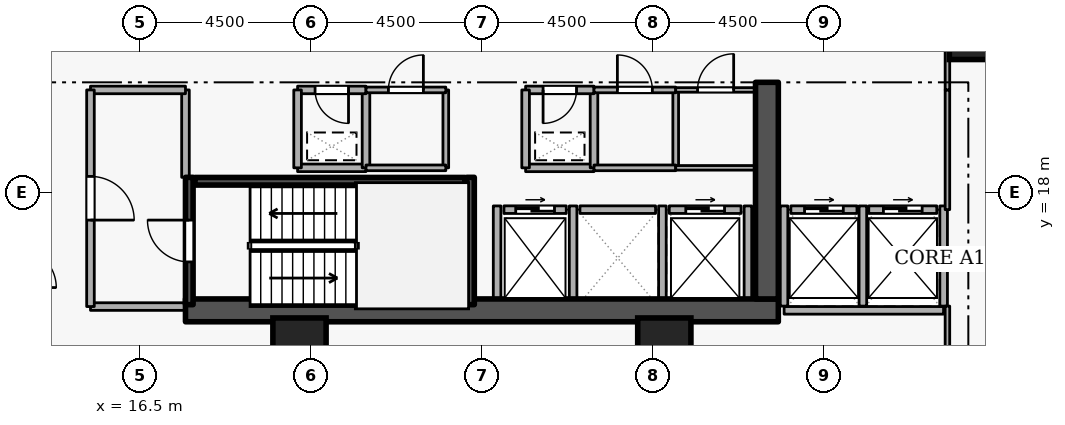
"""IFC4 building model, lengths in metres.
Left out: names, types, materials, properties, quantities, classifications, styles, units other than length and angle.
Written with IfcOpenShell. Run it as: python <this file> out.ifc"""

import sys

from ifc_helpers import new_model, si_unit, direction, frame, frame_2d, origin, origin_2d, place, context, subcontext, project, spatial, rectangle, extrude, element, fill, save


model = new_model("IFC4")
c1 = context("Model", 3, precision=1e-05, world=origin(), true_north=direction((0.0, 1.0)))
c2 = subcontext(c1, "Body", "Model", "MODEL_VIEW")
j1 = project(units=[si_unit("LENGTHUNIT", "METRE"), si_unit("PLANEANGLEUNIT", "RADIAN")], contexts=[c1])
p1 = place(None, origin())
s1 = spatial("IfcSite", under=j1, at=p1, CompositionType="ELEMENT")
p2 = place(p1, origin())
s2 = spatial("IfcBuilding", under=s1, at=p2, CompositionType="ELEMENT")
p3 = place(p2, frame((0.0, 0.0, 68.1)))
s3 = spatial("IfcBuildingStorey", under=s2, at=p3, CompositionType="ELEMENT", Elevation=68.1)
p4 = place(p3, frame((17.7, 14.9, 0.0), z_axis=(0.0, 0.0, 1.0), x_axis=(1.0, 0.0, 0.0)))
e1 = element("IfcWall", 1, at=p4, inside=s3, PredefinedType="SHEAR", context=c2, shape_type="SweptSolid", body=[
    extrude(rectangle(XDim=15.6, YDim=0.6, at=frame_2d((7.8, 0.0))), origin(), (0.0, 0.0, 1.0), 3.6),
])
p5 = place(p3, frame((33.0, 15.2, 0.0), z_axis=(0.0, 0.0, 1.0), x_axis=(0.0, 1.0, 0.0)))
e2 = element("IfcWall", 2, at=p5, inside=s3, PredefinedType="SHEAR", context=c2, shape_type="SweptSolid", body=[
    extrude(rectangle(XDim=5.7, YDim=0.6, at=frame_2d((2.85, 0.0))), origin(), (0.0, 0.0, 1.0), 3.6),
])
for number, where, z_axis, x_axis in (
    (3, (38.5, 22.2, 0.0), (0.0, 0.0, 1.0), (1.0, 0.0, 0.0)),
    (4, (20.7, 14.0, 0.0), (0.0, 0.0, 1.0), (1.0, 0.0, 0.0)),
    (5, (30.3, 14.0, 0.0), (0.0, 0.0, 1.0), (1.0, 0.0, 0.0)),
):
    element("IfcColumn", number, at=place(p3, frame(where, z_axis=z_axis, x_axis=x_axis)), inside=s3, PredefinedType="COLUMN", context=c2, shape_type="SweptSolid", body=[
        extrude(rectangle(XDim=1.4, YDim=1.4, at=origin_2d()), origin(), (0.0, 0.0, 1.0), 3.6),
    ])
p6 = place(p3, frame((26.08, 17.55, 0.0), z_axis=(0.0, 0.0, 1.0), x_axis=(1.0, 0.0, 0.0)))
e6 = element("IfcWall", 6, at=p6, inside=s3, PredefinedType="STANDARD", context=c2, shape_type="SweptSolid", body=[
    extrude(rectangle(XDim=1.64, YDim=0.2, at=frame_2d((0.82, 0.0))), origin(), (0.0, 0.0, 1.0), 3.26),
])
p7 = place(p6, frame((0.31, 0.0, 0.0)))
e7 = element("IfcOpeningElement", 7, at=p7, cuts=e6, PredefinedType="OPENING", context=c2, shape_type="SweptSolid", body=[
    extrude(rectangle(XDim=1.02, YDim=2.06, at=frame_2d((0.51, 1.03))), frame((0.0, 0.11, 0.0), z_axis=(0.0, -1.0, 0.0), x_axis=(1.0, 0.0, 0.0)), (0.0, 0.0, 1.0), 0.22),
])
p8 = place(p3, frame((28.08, 17.55, 0.0), z_axis=(0.0, 0.0, 1.0), x_axis=(1.0, 0.0, 0.0)))
e8 = element("IfcWall", 8, at=p8, inside=s3, PredefinedType="STANDARD", context=c2, shape_type="SweptSolid", body=[
    extrude(rectangle(XDim=1.99, YDim=0.2, at=frame_2d((0.995, 0.0))), origin(), (0.0, 0.0, 1.0), 3.26),
])
p9 = place(p3, frame((30.43, 17.55, 0.0), z_axis=(0.0, 0.0, 1.0), x_axis=(1.0, 0.0, 0.0)))
e9 = element("IfcWall", 9, at=p9, inside=s3, PredefinedType="STANDARD", context=c2, shape_type="SweptSolid", body=[
    extrude(rectangle(XDim=1.89, YDim=0.2, at=frame_2d((0.945, 0.0))), origin(), (0.0, 0.0, 1.0), 3.26),
])
p10 = place(p9, frame((0.435, 0.0, 0.0)))
e10 = element("IfcOpeningElement", 10, at=p10, cuts=e9, PredefinedType="OPENING", context=c2, shape_type="SweptSolid", body=[
    extrude(rectangle(XDim=1.02, YDim=2.06, at=frame_2d((0.51, 1.03))), frame((0.0, 0.11, 0.0), z_axis=(0.0, -1.0, 0.0), x_axis=(1.0, 0.0, 0.0)), (0.0, 0.0, 1.0), 0.22),
])
p11 = place(p3, frame((33.63, 17.55, 0.0), z_axis=(0.0, 0.0, 1.0), x_axis=(1.0, 0.0, 0.0)))
e11 = element("IfcWall", 11, at=p11, inside=s3, PredefinedType="STANDARD", context=c2, shape_type="SweptSolid", body=[
    extrude(rectangle(XDim=1.74, YDim=0.2, at=frame_2d((0.87, 0.0))), origin(), (0.0, 0.0, 1.0), 3.26),
])
p12 = place(p11, frame((0.36, 0.0, 0.0)))
e12 = element("IfcOpeningElement", 12, at=p12, cuts=e11, PredefinedType="OPENING", context=c2, shape_type="SweptSolid", body=[
    extrude(rectangle(XDim=1.02, YDim=2.06, at=frame_2d((0.51, 1.03))), frame((0.0, 0.11, 0.0), z_axis=(0.0, -1.0, 0.0), x_axis=(1.0, 0.0, 0.0)), (0.0, 0.0, 1.0), 0.22),
])
p13 = place(p3, frame((35.68, 17.55, 0.0), z_axis=(0.0, 0.0, 1.0), x_axis=(1.0, 0.0, 0.0)))
e13 = element("IfcWall", 13, at=p13, inside=s3, PredefinedType="STANDARD", context=c2, shape_type="SweptSolid", body=[
    extrude(rectangle(XDim=1.79, YDim=0.2, at=frame_2d((0.895, 0.0))), origin(), (0.0, 0.0, 1.0), 3.26),
])
p14 = place(p13, frame((0.385, 0.0, 0.0)))
e14 = element("IfcOpeningElement", 14, at=p14, cuts=e13, PredefinedType="OPENING", context=c2, shape_type="SweptSolid", body=[
    extrude(rectangle(XDim=1.02, YDim=2.06, at=frame_2d((0.51, 1.03))), frame((0.0, 0.11, 0.0), z_axis=(0.0, -1.0, 0.0), x_axis=(1.0, 0.0, 0.0)), (0.0, 0.0, 1.0), 0.22),
])
for number, where, z_axis, x_axis in (
    (15, (27.9, 15.212, 0.0), (0.0, 0.0, 1.0), (0.0, 1.0, 0.0)),
    (16, (25.9, 15.212, 0.0), (0.0, 0.0, 1.0), (0.0, 1.0, 0.0)),
    (17, (30.25, 15.212, 0.0), (0.0, 0.0, 1.0), (0.0, 1.0, 0.0)),
    (18, (32.5, 15.212, 0.0), (0.0, 0.0, 1.0), (0.0, 1.0, 0.0)),
):
    element("IfcWall", number, at=place(p3, frame(where, z_axis=z_axis, x_axis=x_axis)), inside=s3, PredefinedType="STANDARD", context=c2, shape_type="SweptSolid", body=[
        extrude(rectangle(XDim=2.436, YDim=0.2, at=frame_2d((1.218, 0.0))), origin(), (0.0, 0.0, 1.0), 3.26),
    ])
p15 = place(p3, frame((33.452, 14.9, 0.0), z_axis=(0.0, 0.0, 1.0), x_axis=(1.0, 0.0, 0.0)))
e19 = element("IfcWall", 19, at=p15, inside=s3, PredefinedType="STANDARD", context=c2, shape_type="SweptSolid", body=[
    extrude(rectangle(XDim=4.196, YDim=0.2, at=frame_2d((2.098, 0.0))), origin(), (0.0, 0.0, 1.0), 3.26),
])
for number, where, z_axis, x_axis in (
    (20, (35.525, 15.012, 0.0), (0.0, 0.0, 1.0), (0.0, 1.0, 0.0)),
    (21, (33.45, 15.012, 0.0), (0.0, 0.0, 1.0), (0.0, 1.0, 0.0)),
    (22, (37.65, 15.012, 0.0), (0.0, 0.0, 1.0), (0.0, 1.0, 0.0)),
):
    element("IfcWall", number, at=place(p3, frame(where, z_axis=z_axis, x_axis=x_axis)), inside=s3, PredefinedType="STANDARD", context=c2, shape_type="SweptSolid", body=[
        extrude(rectangle(XDim=2.636, YDim=0.2, at=frame_2d((1.318, 0.0))), origin(), (0.0, 0.0, 1.0), 3.26),
    ])
p16 = place(p3, frame((17.8, 15.05, 0.0), z_axis=(0.0, 0.0, 1.0), x_axis=(0.0, 1.0, 0.0)))
e23 = element("IfcWall", 23, at=p16, inside=s3, PredefinedType="SHEAR", context=c2, shape_type="SweptSolid", body=[
    extrude(rectangle(XDim=3.35, YDim=0.2, at=frame_2d((1.675, 0.0))), origin(), (0.0, 0.0, 1.0), 3.6),
])
p17 = place(p16, frame((1.125, 0.0, 0.0)))
e24 = element("IfcOpeningElement", 24, at=p17, cuts=e23, PredefinedType="OPENING", context=c2, shape_type="SweptSolid", body=[
    extrude(rectangle(XDim=1.1, YDim=2.1, at=frame_2d((0.55, 1.05))), frame((0.0, 0.11, 0.0), z_axis=(0.0, -1.0, 0.0), x_axis=(1.0, 0.0, 0.0)), (0.0, 0.0, 1.0), 0.22),
])
p18 = place(p3, frame((25.2, 18.4, 0.0), z_axis=(0.0, 0.0, 1.0), x_axis=(0.0, -1.0, 0.0)))
e25 = element("IfcWall", 25, at=p18, inside=s3, PredefinedType="SHEAR", context=c2, shape_type="SweptSolid", body=[
    extrude(rectangle(XDim=3.35, YDim=0.2, at=frame_2d((1.675, 0.0))), origin(), (0.0, 0.0, 1.0), 3.6),
])
p19 = place(p3, frame((25.05, 18.297, 0.0), z_axis=(0.0, 0.0, 1.0), x_axis=(-1.0, 0.0, 0.0)))
e26 = element("IfcWall", 26, at=p19, inside=s3, PredefinedType="SHEAR", context=c2, shape_type="SweptSolid", body=[
    extrude(rectangle(XDim=7.1, YDim=0.2, at=frame_2d((3.55, 0.0))), origin(), (0.0, 0.0, 1.0), 3.6),
])
p20 = place(p3, frame((15.2, 15.0, 0.0), z_axis=(0.0, 0.0, 1.0), x_axis=(1.0, 0.0, 0.0)))
e27 = element("IfcWall", 27, at=p20, inside=s3, PredefinedType="STANDARD", context=c2, shape_type="SweptSolid", body=[
    extrude(rectangle(XDim=2.5, YDim=0.2, at=frame_2d((1.25, 0.0))), origin(), (0.0, 0.0, 1.0), 3.26),
])
p21 = place(p3, frame((17.7, 18.4, 0.0), z_axis=(0.0, 0.0, 1.0), x_axis=(0.0, 1.0, 0.0)))
e28 = element("IfcWall", 28, at=p21, inside=s3, PredefinedType="STANDARD", context=c2, shape_type="SweptSolid", body=[
    extrude(rectangle(XDim=2.3, YDim=0.2, at=frame_2d((1.15, 0.0))), origin(), (0.0, 0.0, 1.0), 2.465),
])
p22 = place(p3, frame((17.7, 20.7, 0.0), z_axis=(0.0, 0.0, 1.0), x_axis=(-1.0, 0.0, 0.0)))
e29 = element("IfcWall", 29, at=p22, inside=s3, PredefinedType="STANDARD", context=c2, shape_type="SweptSolid", body=[
    extrude(rectangle(XDim=2.5, YDim=0.2, at=frame_2d((1.25, 0.0))), origin(), (0.0, 0.0, 1.0), 3.26),
])
p23 = place(p3, frame((15.2, 20.7, 0.0), z_axis=(0.0, 0.0, 1.0), x_axis=(0.0, -1.0, 0.0)))
e30 = element("IfcWall", 30, at=p23, inside=s3, PredefinedType="STANDARD", context=c2, shape_type="SweptSolid", body=[
    extrude(rectangle(XDim=5.7, YDim=0.2, at=frame_2d((2.85, 0.0))), origin(), (0.0, 0.0, 1.0), 3.26),
])
p24 = place(p23, frame((2.275, 0.0, 0.0)))
e31 = element("IfcOpeningElement", 31, at=p24, cuts=e30, PredefinedType="OPENING", context=c2, shape_type="SweptSolid", body=[
    extrude(rectangle(XDim=1.15, YDim=2.1, at=frame_2d((0.575, 1.05))), frame((0.0, 0.11, 0.0), z_axis=(0.0, -1.0, 0.0), x_axis=(1.0, 0.0, 0.0)), (0.0, 0.0, 1.0), 0.22),
])
p25 = place(p3, frame((26.65, 18.65, 0.0), z_axis=(0.0, 0.0, 1.0), x_axis=(1.0, 0.0, 0.0)))
e32 = element("IfcWall", 32, at=p25, inside=s3, PredefinedType="STANDARD", context=c2, shape_type="SweptSolid", body=[
    extrude(rectangle(XDim=1.8, YDim=0.2, at=frame_2d((0.9, 0.0))), origin(), (0.0, 0.0, 1.0), 3.26),
])
p26 = place(p3, frame((28.45, 18.65, 0.0), z_axis=(0.0, 0.0, 1.0), x_axis=(0.0, 1.0, 0.0)))
e33 = element("IfcWall", 33, at=p26, inside=s3, PredefinedType="STANDARD", context=c2, shape_type="SweptSolid", body=[
    extrude(rectangle(XDim=2.05, YDim=0.2, at=frame_2d((1.025, 0.0))), origin(), (0.0, 0.0, 1.0), 3.26),
])
p27 = place(p3, frame((28.45, 20.7, 0.0), z_axis=(0.0, 0.0, 1.0), x_axis=(-1.0, 0.0, 0.0)))
e34 = element("IfcWall", 34, at=p27, inside=s3, PredefinedType="STANDARD", context=c2, shape_type="SweptSolid", body=[
    extrude(rectangle(XDim=1.8, YDim=0.2, at=frame_2d((0.9, 0.0))), origin(), (0.0, 0.0, 1.0), 3.26),
])
p28 = place(p27, frame((0.46, 0.0, 0.0)))
e35 = element("IfcOpeningElement", 35, at=p28, cuts=e34, PredefinedType="OPENING", context=c2, shape_type="SweptSolid", body=[
    extrude(rectangle(XDim=0.88, YDim=2.04, at=frame_2d((0.44, 1.02))), frame((0.0, 0.11, 0.0), z_axis=(0.0, -1.0, 0.0), x_axis=(1.0, 0.0, 0.0)), (0.0, 0.0, 1.0), 0.22),
])
p29 = place(p3, frame((26.65, 20.7, 0.0), z_axis=(0.0, 0.0, 1.0), x_axis=(0.0, -1.0, 0.0)))
e36 = element("IfcWall", 36, at=p29, inside=s3, PredefinedType="STANDARD", context=c2, shape_type="SweptSolid", body=[
    extrude(rectangle(XDim=2.05, YDim=0.2, at=frame_2d((1.025, 0.0))), origin(), (0.0, 0.0, 1.0), 3.26),
])
p30 = place(p3, frame((20.65, 18.65, 0.0), z_axis=(0.0, 0.0, 1.0), x_axis=(1.0, 0.0, 0.0)))
e37 = element("IfcWall", 37, at=p30, inside=s3, PredefinedType="STANDARD", context=c2, shape_type="SweptSolid", body=[
    extrude(rectangle(XDim=1.8, YDim=0.2, at=frame_2d((0.9, 0.0))), origin(), (0.0, 0.0, 1.0), 3.26),
])
p31 = place(p3, frame((22.45, 18.65, 0.0), z_axis=(0.0, 0.0, 1.0), x_axis=(0.0, 1.0, 0.0)))
e38 = element("IfcWall", 38, at=p31, inside=s3, PredefinedType="STANDARD", context=c2, shape_type="SweptSolid", body=[
    extrude(rectangle(XDim=2.05, YDim=0.2, at=frame_2d((1.025, 0.0))), origin(), (0.0, 0.0, 1.0), 3.26),
])
p32 = place(p3, frame((22.45, 20.7, 0.0), z_axis=(0.0, 0.0, 1.0), x_axis=(-1.0, 0.0, 0.0)))
e39 = element("IfcWall", 39, at=p32, inside=s3, PredefinedType="STANDARD", context=c2, shape_type="SweptSolid", body=[
    extrude(rectangle(XDim=1.8, YDim=0.2, at=frame_2d((0.9, 0.0))), origin(), (0.0, 0.0, 1.0), 3.26),
])
p33 = place(p32, frame((0.46, 0.0, 0.0)))
e40 = element("IfcOpeningElement", 40, at=p33, cuts=e39, PredefinedType="OPENING", context=c2, shape_type="SweptSolid", body=[
    extrude(rectangle(XDim=0.88, YDim=2.04, at=frame_2d((0.44, 1.02))), frame((0.0, 0.11, 0.0), z_axis=(0.0, -1.0, 0.0), x_axis=(1.0, 0.0, 0.0)), (0.0, 0.0, 1.0), 0.22),
])
p34 = place(p3, frame((20.65, 20.7, 0.0), z_axis=(0.0, 0.0, 1.0), x_axis=(0.0, -1.0, 0.0)))
e41 = element("IfcWall", 41, at=p34, inside=s3, PredefinedType="STANDARD", context=c2, shape_type="SweptSolid", body=[
    extrude(rectangle(XDim=2.05, YDim=0.2, at=frame_2d((1.025, 0.0))), origin(), (0.0, 0.0, 1.0), 3.26),
])
p35 = place(p3, frame((24.55, 20.7, 0.0), z_axis=(0.0, 0.0, 1.0), x_axis=(0.0, -1.0, 0.0)))
e42 = element("IfcWall", 42, at=p35, inside=s3, PredefinedType="PARTITIONING", context=c2, shape_type="SweptSolid", body=[
    extrude(rectangle(XDim=2.05, YDim=0.15, at=frame_2d((1.025, 0.0))), origin(), (0.0, 0.0, 1.0), 3.26),
])
p36 = place(p3, frame((24.55, 18.65, 0.0), z_axis=(0.0, 0.0, 1.0), x_axis=(-1.0, 0.0, 0.0)))
e43 = element("IfcWall", 43, at=p36, inside=s3, PredefinedType="PARTITIONING", context=c2, shape_type="SweptSolid", body=[
    extrude(rectangle(XDim=2.1, YDim=0.15, at=frame_2d((1.05, 0.0))), origin(), (0.0, 0.0, 1.0), 3.26),
])
p37 = place(p3, frame((22.45, 20.7, 0.0), z_axis=(0.0, 0.0, 1.0), x_axis=(1.0, 0.0, 0.0)))
e44 = element("IfcWall", 44, at=p37, inside=s3, PredefinedType="PARTITIONING", context=c2, shape_type="SweptSolid", body=[
    extrude(rectangle(XDim=2.1, YDim=0.15, at=frame_2d((1.05, 0.0))), origin(), (0.0, 0.0, 1.0), 3.26),
])
p38 = place(p37, frame((0.59, 0.0, 0.0)))
e45 = element("IfcOpeningElement", 45, at=p38, cuts=e44, PredefinedType="OPENING", context=c2, shape_type="SweptSolid", body=[
    extrude(rectangle(XDim=0.92, YDim=2.08, at=frame_2d((0.46, 1.04))), frame((0.0, 0.085, 0.0), z_axis=(0.0, -1.0, 0.0), x_axis=(1.0, 0.0, 0.0)), (0.0, 0.0, 1.0), 0.17),
])
p39 = place(p3, frame((30.6, 20.7, 0.0), z_axis=(0.0, 0.0, 1.0), x_axis=(0.0, -1.0, 0.0)))
e46 = element("IfcWall", 46, at=p39, inside=s3, PredefinedType="PARTITIONING", context=c2, shape_type="SweptSolid", body=[
    extrude(rectangle(XDim=2.05, YDim=0.15, at=frame_2d((1.025, 0.0))), origin(), (0.0, 0.0, 1.0), 3.26),
])
p40 = place(p3, frame((30.6, 18.65, 0.0), z_axis=(0.0, 0.0, 1.0), x_axis=(-1.0, 0.0, 0.0)))
e47 = element("IfcWall", 47, at=p40, inside=s3, PredefinedType="PARTITIONING", context=c2, shape_type="SweptSolid", body=[
    extrude(rectangle(XDim=2.15, YDim=0.15, at=frame_2d((1.075, 0.0))), origin(), (0.0, 0.0, 1.0), 3.26),
])
p41 = place(p3, frame((28.45, 20.7, 0.0), z_axis=(0.0, 0.0, 1.0), x_axis=(1.0, 0.0, 0.0)))
e48 = element("IfcWall", 48, at=p41, inside=s3, PredefinedType="PARTITIONING", context=c2, shape_type="SweptSolid", body=[
    extrude(rectangle(XDim=2.15, YDim=0.15, at=frame_2d((1.075, 0.0))), origin(), (0.0, 0.0, 1.0), 3.26),
])
p42 = place(p41, frame((0.615, 0.0, 0.0)))
e49 = element("IfcOpeningElement", 49, at=p42, cuts=e48, PredefinedType="OPENING", context=c2, shape_type="SweptSolid", body=[
    extrude(rectangle(XDim=0.92, YDim=2.08, at=frame_2d((0.46, 1.04))), frame((0.0, 0.085, 0.0), z_axis=(0.0, -1.0, 0.0), x_axis=(1.0, 0.0, 0.0)), (0.0, 0.0, 1.0), 0.17),
])
p43 = place(p3, frame((32.7, 18.65, 0.0), z_axis=(0.0, 0.0, 1.0), x_axis=(-1.0, 0.0, 0.0)))
e50 = element("IfcWall", 50, at=p43, inside=s3, PredefinedType="PARTITIONING", context=c2, shape_type="SweptSolid", body=[
    extrude(rectangle(XDim=2.1, YDim=0.12, at=frame_2d((1.05, 0.0))), origin(), (0.0, 0.0, 1.0), 3.26),
])
p44 = place(p3, frame((30.6, 20.7, 0.0), z_axis=(0.0, 0.0, 1.0), x_axis=(1.0, 0.0, 0.0)))
e51 = element("IfcWall", 51, at=p44, inside=s3, PredefinedType="PARTITIONING", context=c2, shape_type="SweptSolid", body=[
    extrude(rectangle(XDim=2.1, YDim=0.12, at=frame_2d((1.05, 0.0))), origin(), (0.0, 0.0, 1.0), 3.26),
])
p45 = place(p44, frame((0.575, 0.0, 0.0)))
e52 = element("IfcOpeningElement", 52, at=p45, cuts=e51, PredefinedType="OPENING", context=c2, shape_type="SweptSolid", body=[
    extrude(rectangle(XDim=0.95, YDim=2.1, at=frame_2d((0.475, 1.05))), frame((0.0, 0.07, 0.0), z_axis=(0.0, -1.0, 0.0), x_axis=(1.0, 0.0, 0.0)), (0.0, 0.0, 1.0), 0.14),
])
p46 = place(p3, frame((37.75, 17.55, 0.0), z_axis=(0.0, 0.0, 1.0), x_axis=(0.0, 1.0, 0.0)))
e53 = element("IfcWall", 53, at=p46, inside=s3, PredefinedType="PARTITIONING", context=c2, shape_type="SweptSolid", body=[
    extrude(rectangle(XDim=3.15, YDim=0.12, at=frame_2d((1.575, 0.0))), origin(), (0.0, 0.0, 1.0), 3.26),
])
p47 = place(p3, frame((37.75, 20.7, 0.0), z_axis=(0.0, 0.0, 1.0), x_axis=(0.0, 1.0, 0.0)))
e54 = element("IfcWall", 54, at=p47, inside=s3, PredefinedType="PARTITIONING", context=c2, shape_type="SweptSolid", body=[
    extrude(rectangle(XDim=1.85, YDim=0.12, at=frame_2d((0.925, 0.0))), origin(), (0.0, 0.0, 1.0), 3.26),
])
p48 = place(p3, frame((37.75, 13.15, 0.0), z_axis=(0.0, 0.0, 1.0), x_axis=(0.0, 1.0, 0.0)))
e55 = element("IfcWall", 55, at=p48, inside=s3, PredefinedType="PARTITIONING", context=c2, shape_type="SweptSolid", body=[
    extrude(rectangle(XDim=1.862, YDim=0.12, at=frame_2d((0.931, 0.0))), origin(), (0.0, 0.0, 1.0), 3.26),
])
p49 = place(p7, origin())
e56 = element("IfcDoor", 56, at=p49, inside=s3, OperationType="SLIDING_TO_LEFT", PredefinedType="DOOR", context=c2, shape_type="SweptSolid", body=[
    extrude(rectangle(XDim=1.02, YDim=2.06, at=frame_2d((0.51, 1.03))), frame((0.0, 0.025, 0.0), z_axis=(0.0, -1.0, 0.0), x_axis=(1.0, 0.0, 0.0)), (0.0, 0.0, 1.0), 0.05),
])
fill(e7, e56)
p50 = place(p10, origin())
e57 = element("IfcDoor", 57, at=p50, inside=s3, OperationType="SLIDING_TO_LEFT", PredefinedType="DOOR", context=c2, shape_type="SweptSolid", body=[
    extrude(rectangle(XDim=1.02, YDim=2.06, at=frame_2d((0.51, 1.03))), frame((0.0, 0.025, 0.0), z_axis=(0.0, -1.0, 0.0), x_axis=(1.0, 0.0, 0.0)), (0.0, 0.0, 1.0), 0.05),
])
fill(e10, e57)
p51 = place(p12, origin())
e58 = element("IfcDoor", 58, at=p51, inside=s3, OperationType="SLIDING_TO_LEFT", PredefinedType="DOOR", context=c2, shape_type="SweptSolid", body=[
    extrude(rectangle(XDim=1.02, YDim=2.06, at=frame_2d((0.51, 1.03))), frame((0.0, 0.025, 0.0), z_axis=(0.0, -1.0, 0.0), x_axis=(1.0, 0.0, 0.0)), (0.0, 0.0, 1.0), 0.05),
])
fill(e12, e58)
p52 = place(p14, origin())
e59 = element("IfcDoor", 59, at=p52, inside=s3, OperationType="SLIDING_TO_LEFT", PredefinedType="DOOR", context=c2, shape_type="SweptSolid", body=[
    extrude(rectangle(XDim=1.02, YDim=2.06, at=frame_2d((0.51, 1.03))), frame((0.0, 0.025, 0.0), z_axis=(0.0, -1.0, 0.0), x_axis=(1.0, 0.0, 0.0)), (0.0, 0.0, 1.0), 0.05),
])
fill(e14, e59)
p53 = place(p17, origin())
e60 = element("IfcDoor", 60, at=p53, inside=s3, OperationType="SINGLE_SWING_RIGHT", PredefinedType="DOOR", context=c2, shape_type="SweptSolid", body=[
    extrude(rectangle(XDim=1.1, YDim=2.1, at=frame_2d((0.55, 1.05))), frame((0.0, 0.025, 0.0), z_axis=(0.0, -1.0, 0.0), x_axis=(1.0, 0.0, 0.0)), (0.0, 0.0, 1.0), 0.05),
])
fill(e24, e60)
p54 = place(p24, origin())
e61 = element("IfcDoor", 61, at=p54, inside=s3, OperationType="SINGLE_SWING_RIGHT", PredefinedType="DOOR", context=c2, shape_type="SweptSolid", body=[
    extrude(rectangle(XDim=1.15, YDim=2.1, at=frame_2d((0.575, 1.05))), frame((0.0, 0.025, 0.0), z_axis=(0.0, -1.0, 0.0), x_axis=(1.0, 0.0, 0.0)), (0.0, 0.0, 1.0), 0.05),
])
fill(e31, e61)
p55 = place(p28, origin())
e62 = element("IfcDoor", 62, at=p55, inside=s3, OperationType="SINGLE_SWING_RIGHT", PredefinedType="DOOR", context=c2, shape_type="SweptSolid", body=[
    extrude(rectangle(XDim=0.88, YDim=2.04, at=frame_2d((0.44, 1.02))), frame((0.0, 0.025, 0.0), z_axis=(0.0, -1.0, 0.0), x_axis=(1.0, 0.0, 0.0)), (0.0, 0.0, 1.0), 0.05),
])
fill(e35, e62)
p56 = place(p33, origin())
e63 = element("IfcDoor", 63, at=p56, inside=s3, OperationType="SINGLE_SWING_LEFT", PredefinedType="DOOR", context=c2, shape_type="SweptSolid", body=[
    extrude(rectangle(XDim=0.88, YDim=2.04, at=frame_2d((0.44, 1.02))), frame((0.0, 0.025, 0.0), z_axis=(0.0, -1.0, 0.0), x_axis=(1.0, 0.0, 0.0)), (0.0, 0.0, 1.0), 0.05),
])
fill(e40, e63)
p57 = place(p38, origin())
e64 = element("IfcDoor", 64, at=p57, inside=s3, OperationType="SINGLE_SWING_RIGHT", PredefinedType="DOOR", context=c2, shape_type="SweptSolid", body=[
    extrude(rectangle(XDim=0.92, YDim=2.08, at=frame_2d((0.46, 1.04))), frame((0.0, 0.025, 0.0), z_axis=(0.0, -1.0, 0.0), x_axis=(1.0, 0.0, 0.0)), (0.0, 0.0, 1.0), 0.05),
])
fill(e45, e64)
p58 = place(p42, origin())
e65 = element("IfcDoor", 65, at=p58, inside=s3, OperationType="SINGLE_SWING_LEFT", PredefinedType="DOOR", context=c2, shape_type="SweptSolid", body=[
    extrude(rectangle(XDim=0.92, YDim=2.08, at=frame_2d((0.46, 1.04))), frame((0.0, 0.025, 0.0), z_axis=(0.0, -1.0, 0.0), x_axis=(1.0, 0.0, 0.0)), (0.0, 0.0, 1.0), 0.05),
])
fill(e49, e65)
p59 = place(p45, origin())
e66 = element("IfcDoor", 66, at=p59, inside=s3, OperationType="SINGLE_SWING_RIGHT", PredefinedType="DOOR", context=c2, shape_type="SweptSolid", body=[
    extrude(rectangle(XDim=0.95, YDim=2.1, at=frame_2d((0.475, 1.05))), frame((0.0, 0.025, 0.0), z_axis=(0.0, -1.0, 0.0), x_axis=(1.0, 0.0, 0.0)), (0.0, 0.0, 1.0), 0.05),
])
fill(e52, e66)
save(model, sys.argv[1])
